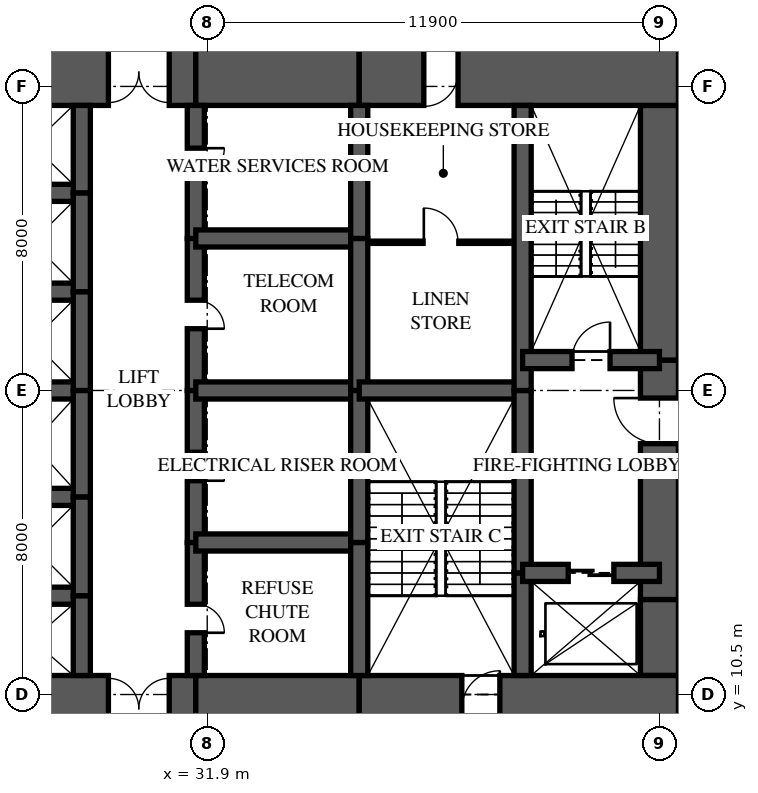
"""IFC4 building model, lengths in metres.
Left out: names, types, materials, properties, quantities, classifications, styles, units other than length and angle.
Written with IfcOpenShell. Run it as: python <this file> out.ifc"""

import sys

from ifc_helpers import new_model, si_unit, direction, frame, frame_2d, origin, place, context, subcontext, project, spatial, rectangle, extrude, element, fill, save


model = new_model("IFC4")
c1 = context("Model", 3, precision=1e-05, world=origin(), true_north=direction((0.0, 1.0)))
c2 = subcontext(c1, "Body", "Model", "MODEL_VIEW")
j1 = project(units=[si_unit("LENGTHUNIT", "METRE"), si_unit("PLANEANGLEUNIT", "RADIAN")], contexts=[c1])
p1 = place(None, origin())
s1 = spatial("IfcSite", under=j1, at=p1, CompositionType="ELEMENT")
p2 = place(p1, origin())
s2 = spatial("IfcBuilding", under=s1, at=p2, CompositionType="ELEMENT")
p3 = place(p2, frame((0.0, 0.0, 16.0)))
s3 = spatial("IfcBuildingStorey", under=s2, at=p3, CompositionType="ELEMENT", Elevation=16.0)
p4 = place(p3, frame((26.0, 10.125, 0.0), z_axis=(0.0, 0.0, 1.0), x_axis=(1.0, 0.0, 0.0)))
e1 = element("IfcWall", 1, at=p4, inside=s3, PredefinedType="SHEAR", context=c2, shape_type="SweptSolid", body=[
    extrude(rectangle(XDim=5.6, YDim=1.75, at=frame_2d((2.8, 0.0))), origin(), (0.0, 0.0, 1.0), 5.0),
])
p5 = place(p4, frame((3.3, 0.0, 0.0)))
e2 = element("IfcOpeningElement", 2, at=p5, cuts=e1, PredefinedType="OPENING", context=c2, shape_type="SweptSolid", body=[
    extrude(rectangle(XDim=1.6, YDim=2.1, at=frame_2d((0.8, 1.05))), frame((0.0, 0.885, 0.0), z_axis=(0.0, -1.0, 0.0), x_axis=(1.0, 0.0, 0.0)), (0.0, 0.0, 1.0), 1.77),
])
p6 = place(p3, frame((31.6, 10.125, 0.0), z_axis=(0.0, 0.0, 1.0), x_axis=(1.0, 0.0, 0.0)))
e3 = element("IfcWall", 3, at=p6, inside=s3, PredefinedType="SHEAR", context=c2, shape_type="SweptSolid", body=[
    extrude(rectangle(XDim=4.3, YDim=1.75, at=frame_2d((2.15, 0.0))), origin(), (0.0, 0.0, 1.0), 5.0),
])
p7 = place(p3, frame((35.9, 10.125, 0.0), z_axis=(0.0, 0.0, 1.0), x_axis=(1.0, 0.0, 0.0)))
e4 = element("IfcWall", 4, at=p7, inside=s3, PredefinedType="SHEAR", context=c2, shape_type="SweptSolid", body=[
    extrude(rectangle(XDim=8.4, YDim=1.75, at=frame_2d((4.2, 0.0))), origin(), (0.0, 0.0, 1.0), 5.0),
])
p8 = place(p7, frame((2.7, 0.0, 0.0)))
e5 = element("IfcOpeningElement", 5, at=p8, cuts=e4, PredefinedType="OPENING", context=c2, shape_type="SweptSolid", body=[
    extrude(rectangle(XDim=1.0, YDim=2.1, at=frame_2d((0.5, 1.05))), frame((0.0, 0.885, 0.0), z_axis=(0.0, -1.0, 0.0), x_axis=(1.0, 0.0, 0.0)), (0.0, 0.0, 1.0), 1.77),
])
p9 = place(p3, frame((44.3, 26.875, 0.0), z_axis=(0.0, 0.0, 1.0), x_axis=(-1.0, 0.0, 0.0)))
e6 = element("IfcWall", 6, at=p9, inside=s3, PredefinedType="SHEAR", context=c2, shape_type="SweptSolid", body=[
    extrude(rectangle(XDim=8.4, YDim=1.75, at=frame_2d((4.2, 0.0))), origin(), (0.0, 0.0, 1.0), 5.0),
])
p10 = place(p9, frame((5.8, 0.0, 0.0)))
e7 = element("IfcOpeningElement", 7, at=p10, cuts=e6, PredefinedType="OPENING", context=c2, shape_type="SweptSolid", body=[
    extrude(rectangle(XDim=0.9, YDim=2.1, at=frame_2d((0.45, 1.05))), frame((0.0, 0.885, 0.0), z_axis=(0.0, -1.0, 0.0), x_axis=(1.0, 0.0, 0.0)), (0.0, 0.0, 1.0), 1.77),
])
p11 = place(p3, frame((35.9, 26.875, 0.0), z_axis=(0.0, 0.0, 1.0), x_axis=(-1.0, 0.0, 0.0)))
e8 = element("IfcWall", 8, at=p11, inside=s3, PredefinedType="SHEAR", context=c2, shape_type="SweptSolid", body=[
    extrude(rectangle(XDim=4.3, YDim=1.75, at=frame_2d((2.15, 0.0))), origin(), (0.0, 0.0, 1.0), 5.0),
])
p12 = place(p3, frame((31.6, 26.875, 0.0), z_axis=(0.0, 0.0, 1.0), x_axis=(-1.0, 0.0, 0.0)))
e9 = element("IfcWall", 9, at=p12, inside=s3, PredefinedType="SHEAR", context=c2, shape_type="SweptSolid", body=[
    extrude(rectangle(XDim=5.6, YDim=1.75, at=frame_2d((2.8, 0.0))), origin(), (0.0, 0.0, 1.0), 5.0),
])
p13 = place(p12, frame((0.7, 0.0, 0.0)))
e10 = element("IfcOpeningElement", 10, at=p13, cuts=e9, PredefinedType="OPENING", context=c2, shape_type="SweptSolid", body=[
    extrude(rectangle(XDim=1.6, YDim=2.1, at=frame_2d((0.8, 1.05))), frame((0.0, 0.885, 0.0), z_axis=(0.0, -1.0, 0.0), x_axis=(1.0, 0.0, 0.0)), (0.0, 0.0, 1.0), 1.77),
])
p14 = place(p3, frame((43.8, 11.0, 0.0), z_axis=(0.0, 0.0, 1.0), x_axis=(0.0, 1.0, 0.0)))
e11 = element("IfcWall", 11, at=p14, inside=s3, PredefinedType="SHEAR", context=c2, shape_type="SweptSolid", body=[
    extrude(rectangle(XDim=2.0, YDim=1.0, at=frame_2d((1.0, 0.0))), origin(), (0.0, 0.0, 1.0), 5.0),
])
p15 = place(p3, frame((43.8, 13.0, 0.0), z_axis=(0.0, 0.0, 1.0), x_axis=(0.0, 1.0, 0.0)))
e12 = element("IfcWall", 12, at=p15, inside=s3, PredefinedType="SHEAR", context=c2, shape_type="SweptSolid", body=[
    extrude(rectangle(XDim=6.3, YDim=1.0, at=frame_2d((3.15, 0.0))), origin(), (0.0, 0.0, 1.0), 5.0),
])
p16 = place(p15, frame((4.1, 0.0, 0.0)))
e13 = element("IfcOpeningElement", 13, at=p16, cuts=e12, PredefinedType="OPENING", context=c2, shape_type="SweptSolid", body=[
    extrude(rectangle(XDim=1.2, YDim=2.2, at=frame_2d((0.6, 1.1))), frame((0.0, 0.51, 0.0), z_axis=(0.0, -1.0, 0.0), x_axis=(1.0, 0.0, 0.0)), (0.0, 0.0, 1.0), 1.02),
])
p17 = place(p3, frame((43.8, 19.3, 0.0), z_axis=(0.0, 0.0, 1.0), x_axis=(0.0, 1.0, 0.0)))
e14 = element("IfcWall", 14, at=p17, inside=s3, PredefinedType="SHEAR", context=c2, shape_type="SweptSolid", body=[
    extrude(rectangle(XDim=6.7, YDim=1.0, at=frame_2d((3.35, 0.0))), origin(), (0.0, 0.0, 1.0), 5.0),
])
p18 = place(p3, frame((28.6, 11.0, 0.0), z_axis=(0.0, 0.0, 1.0), x_axis=(0.0, 1.0, 0.0)))
e15 = element("IfcWall", 15, at=p18, inside=s3, PredefinedType="SHEAR", context=c2, shape_type="SweptSolid", body=[
    extrude(rectangle(XDim=2.1, YDim=0.45, at=frame_2d((1.05, 0.0))), origin(), (0.0, 0.0, 1.0), 5.0),
])
p19 = place(p3, frame((28.6, 13.1, 0.0), z_axis=(0.0, 0.0, 1.0), x_axis=(0.0, 1.0, 0.0)))
e16 = element("IfcWall", 16, at=p19, inside=s3, PredefinedType="SHEAR", context=c2, shape_type="SweptSolid", body=[
    extrude(rectangle(XDim=2.6, YDim=0.45, at=frame_2d((1.3, 0.0))), origin(), (0.0, 0.0, 1.0), 5.0),
])
p20 = place(p3, frame((28.6, 15.7, 0.0), z_axis=(0.0, 0.0, 1.0), x_axis=(0.0, 1.0, 0.0)))
e17 = element("IfcWall", 17, at=p20, inside=s3, PredefinedType="SHEAR", context=c2, shape_type="SweptSolid", body=[
    extrude(rectangle(XDim=2.8, YDim=0.45, at=frame_2d((1.4, 0.0))), origin(), (0.0, 0.0, 1.0), 5.0),
])
p21 = place(p3, frame((28.6, 18.5, 0.0), z_axis=(0.0, 0.0, 1.0), x_axis=(0.0, 1.0, 0.0)))
e18 = element("IfcWall", 18, at=p21, inside=s3, PredefinedType="SHEAR", context=c2, shape_type="SweptSolid", body=[
    extrude(rectangle(XDim=2.6, YDim=0.45, at=frame_2d((1.3, 0.0))), origin(), (0.0, 0.0, 1.0), 5.0),
])
p22 = place(p3, frame((28.6, 21.1, 0.0), z_axis=(0.0, 0.0, 1.0), x_axis=(0.0, 1.0, 0.0)))
e19 = element("IfcWall", 19, at=p22, inside=s3, PredefinedType="SHEAR", context=c2, shape_type="SweptSolid", body=[
    extrude(rectangle(XDim=2.6, YDim=0.45, at=frame_2d((1.3, 0.0))), origin(), (0.0, 0.0, 1.0), 5.0),
])
p23 = place(p3, frame((28.6, 23.7, 0.0), z_axis=(0.0, 0.0, 1.0), x_axis=(0.0, 1.0, 0.0)))
e20 = element("IfcWall", 20, at=p23, inside=s3, PredefinedType="SHEAR", context=c2, shape_type="SweptSolid", body=[
    extrude(rectangle(XDim=2.3, YDim=0.45, at=frame_2d((1.15, 0.0))), origin(), (0.0, 0.0, 1.0), 5.0),
])
p24 = place(p3, frame((31.6, 11.0, 0.0), z_axis=(0.0, 0.0, 1.0), x_axis=(0.0, 1.0, 0.0)))
e21 = element("IfcWall", 21, at=p24, inside=s3, PredefinedType="SHEAR", context=c2, shape_type="SweptSolid", body=[
    extrude(rectangle(XDim=3.5, YDim=0.45, at=frame_2d((1.75, 0.0))), origin(), (0.0, 0.0, 1.0), 5.0),
])
p25 = place(p24, frame((1.125, 0.0, 0.0)))
e22 = element("IfcOpeningElement", 22, at=p25, cuts=e21, PredefinedType="OPENING", context=c2, shape_type="SweptSolid", body=[
    extrude(rectangle(XDim=0.75, YDim=2.1, at=frame_2d((0.375, 1.05))), frame((0.0, 0.235, 0.0), z_axis=(0.0, -1.0, 0.0), x_axis=(1.0, 0.0, 0.0)), (0.0, 0.0, 1.0), 0.47),
])
p26 = place(p3, frame((31.6, 14.5, 0.0), z_axis=(0.0, 0.0, 1.0), x_axis=(0.0, 1.0, 0.0)))
e23 = element("IfcWall", 23, at=p26, inside=s3, PredefinedType="SHEAR", context=c2, shape_type="SweptSolid", body=[
    extrude(rectangle(XDim=4.0, YDim=0.45, at=frame_2d((2.0, 0.0))), origin(), (0.0, 0.0, 1.0), 5.0),
])
p27 = place(p26, frame((1.625, 0.0, 0.0)))
e24 = element("IfcOpeningElement", 24, at=p27, cuts=e23, PredefinedType="OPENING", context=c2, shape_type="SweptSolid", body=[
    extrude(rectangle(XDim=0.75, YDim=2.1, at=frame_2d((0.375, 1.05))), frame((0.0, 0.235, 0.0), z_axis=(0.0, -1.0, 0.0), x_axis=(1.0, 0.0, 0.0)), (0.0, 0.0, 1.0), 0.47),
])
p28 = place(p3, frame((31.6, 18.5, 0.0), z_axis=(0.0, 0.0, 1.0), x_axis=(0.0, 1.0, 0.0)))
e25 = element("IfcWall", 25, at=p28, inside=s3, PredefinedType="SHEAR", context=c2, shape_type="SweptSolid", body=[
    extrude(rectangle(XDim=4.0, YDim=0.45, at=frame_2d((2.0, 0.0))), origin(), (0.0, 0.0, 1.0), 5.0),
])
p29 = place(p28, frame((1.625, 0.0, 0.0)))
e26 = element("IfcOpeningElement", 26, at=p29, cuts=e25, PredefinedType="OPENING", context=c2, shape_type="SweptSolid", body=[
    extrude(rectangle(XDim=0.75, YDim=2.1, at=frame_2d((0.375, 1.05))), frame((0.0, 0.235, 0.0), z_axis=(0.0, -1.0, 0.0), x_axis=(1.0, 0.0, 0.0)), (0.0, 0.0, 1.0), 0.47),
])
p30 = place(p3, frame((31.6, 22.5, 0.0), z_axis=(0.0, 0.0, 1.0), x_axis=(0.0, 1.0, 0.0)))
e27 = element("IfcWall", 27, at=p30, inside=s3, PredefinedType="SHEAR", context=c2, shape_type="SweptSolid", body=[
    extrude(rectangle(XDim=3.5, YDim=0.45, at=frame_2d((1.75, 0.0))), origin(), (0.0, 0.0, 1.0), 5.0),
])
p31 = place(p30, frame((1.625, 0.0, 0.0)))
e28 = element("IfcOpeningElement", 28, at=p31, cuts=e27, PredefinedType="OPENING", context=c2, shape_type="SweptSolid", body=[
    extrude(rectangle(XDim=0.75, YDim=2.1, at=frame_2d((0.375, 1.05))), frame((0.0, 0.235, 0.0), z_axis=(0.0, -1.0, 0.0), x_axis=(1.0, 0.0, 0.0)), (0.0, 0.0, 1.0), 0.47),
])
p32 = place(p3, frame((35.9, 11.0, 0.0), z_axis=(0.0, 0.0, 1.0), x_axis=(0.0, 1.0, 0.0)))
e29 = element("IfcWall", 29, at=p32, inside=s3, PredefinedType="SHEAR", context=c2, shape_type="SweptSolid", body=[
    extrude(rectangle(XDim=3.5, YDim=0.45, at=frame_2d((1.75, 0.0))), origin(), (0.0, 0.0, 1.0), 5.0),
])
for number, where, z_axis, x_axis in (
    (30, (35.9, 14.5, 0.0), (0.0, 0.0, 1.0), (0.0, 1.0, 0.0)),
    (31, (35.9, 18.5, 0.0), (0.0, 0.0, 1.0), (0.0, 1.0, 0.0)),
):
    element("IfcWall", number, at=place(p3, frame(where, z_axis=z_axis, x_axis=x_axis)), inside=s3, PredefinedType="SHEAR", context=c2, shape_type="SweptSolid", body=[
        extrude(rectangle(XDim=4.0, YDim=0.45, at=frame_2d((2.0, 0.0))), origin(), (0.0, 0.0, 1.0), 5.0),
    ])
p33 = place(p3, frame((35.9, 22.5, 0.0), z_axis=(0.0, 0.0, 1.0), x_axis=(0.0, 1.0, 0.0)))
e32 = element("IfcWall", 32, at=p33, inside=s3, PredefinedType="SHEAR", context=c2, shape_type="SweptSolid", body=[
    extrude(rectangle(XDim=3.5, YDim=0.45, at=frame_2d((1.75, 0.0))), origin(), (0.0, 0.0, 1.0), 5.0),
])
p34 = place(p3, frame((40.2, 11.0, 0.0), z_axis=(0.0, 0.0, 1.0), x_axis=(0.0, 1.0, 0.0)))
e33 = element("IfcWall", 33, at=p34, inside=s3, PredefinedType="SHEAR", context=c2, shape_type="SweptSolid", body=[
    extrude(rectangle(XDim=2.7, YDim=0.45, at=frame_2d((1.35, 0.0))), origin(), (0.0, 0.0, 1.0), 5.0),
])
p35 = place(p3, frame((40.2, 13.7, 0.0), z_axis=(0.0, 0.0, 1.0), x_axis=(0.0, 1.0, 0.0)))
e34 = element("IfcWall", 34, at=p35, inside=s3, PredefinedType="SHEAR", context=c2, shape_type="SweptSolid", body=[
    extrude(rectangle(XDim=4.8, YDim=0.45, at=frame_2d((2.4, 0.0))), origin(), (0.0, 0.0, 1.0), 5.0),
])
p36 = place(p3, frame((40.2, 18.5, 0.0), z_axis=(0.0, 0.0, 1.0), x_axis=(0.0, 1.0, 0.0)))
e35 = element("IfcWall", 35, at=p36, inside=s3, PredefinedType="SHEAR", context=c2, shape_type="SweptSolid", body=[
    extrude(rectangle(XDim=7.5, YDim=0.45, at=frame_2d((3.75, 0.0))), origin(), (0.0, 0.0, 1.0), 5.0),
])
for number, where, z_axis, x_axis in (
    (36, (26.0, 13.1, 0.0), (0.0, 0.0, 1.0), (1.0, 0.0, 0.0)),
    (37, (26.0, 15.7, 0.0), (0.0, 0.0, 1.0), (1.0, 0.0, 0.0)),
    (38, (26.0, 18.5, 0.0), (0.0, 0.0, 1.0), (1.0, 0.0, 0.0)),
    (39, (26.0, 21.1, 0.0), (0.0, 0.0, 1.0), (1.0, 0.0, 0.0)),
    (40, (26.0, 23.7, 0.0), (0.0, 0.0, 1.0), (1.0, 0.0, 0.0)),
):
    element("IfcWall", number, at=place(p3, frame(where, z_axis=z_axis, x_axis=x_axis)), inside=s3, PredefinedType="SHEAR", context=c2, shape_type="SweptSolid", body=[
        extrude(rectangle(XDim=2.6, YDim=0.45, at=frame_2d((1.3, 0.0))), origin(), (0.0, 0.0, 1.0), 5.0),
    ])
for number, where, z_axis, x_axis in (
    (41, (31.6, 14.5, 0.0), (0.0, 0.0, 1.0), (1.0, 0.0, 0.0)),
    (42, (31.6, 18.5, 0.0), (0.0, 0.0, 1.0), (1.0, 0.0, 0.0)),
    (43, (31.6, 22.5, 0.0), (0.0, 0.0, 1.0), (1.0, 0.0, 0.0)),
):
    element("IfcWall", number, at=place(p3, frame(where, z_axis=z_axis, x_axis=x_axis)), inside=s3, PredefinedType="SHEAR", context=c2, shape_type="SweptSolid", body=[
        extrude(rectangle(XDim=4.3, YDim=0.45, at=frame_2d((2.15, 0.0))), origin(), (0.0, 0.0, 1.0), 5.0),
    ])
p37 = place(p3, frame((35.9, 18.5, 0.0), z_axis=(0.0, 0.0, 1.0), x_axis=(1.0, 0.0, 0.0)))
e44 = element("IfcWall", 44, at=p37, inside=s3, PredefinedType="SHEAR", context=c2, shape_type="SweptSolid", body=[
    extrude(rectangle(XDim=4.3, YDim=0.45, at=frame_2d((2.15, 0.0))), origin(), (0.0, 0.0, 1.0), 5.0),
])
p38 = place(p3, frame((40.2, 13.7, 0.0), z_axis=(0.0, 0.0, 1.0), x_axis=(1.0, 0.0, 0.0)))
e45 = element("IfcWall", 45, at=p38, inside=s3, PredefinedType="SHEAR", context=c2, shape_type="SweptSolid", body=[
    extrude(rectangle(XDim=3.6, YDim=0.45, at=frame_2d((1.8, 0.0))), origin(), (0.0, 0.0, 1.0), 5.0),
])
p39 = place(p38, frame((1.2, 0.0, 0.0)))
e46 = element("IfcOpeningElement", 46, at=p39, cuts=e45, PredefinedType="OPENING", context=c2, shape_type="SweptSolid", body=[
    extrude(rectangle(XDim=1.2, YDim=2.1, at=frame_2d((0.6, 1.05))), frame((0.0, 0.235, 0.0), z_axis=(0.0, -1.0, 0.0), x_axis=(1.0, 0.0, 0.0)), (0.0, 0.0, 1.0), 0.47),
])
p40 = place(p3, frame((40.2, 19.3, 0.0), z_axis=(0.0, 0.0, 1.0), x_axis=(1.0, 0.0, 0.0)))
e47 = element("IfcWall", 47, at=p40, inside=s3, PredefinedType="SHEAR", context=c2, shape_type="SweptSolid", body=[
    extrude(rectangle(XDim=3.6, YDim=0.45, at=frame_2d((1.8, 0.0))), origin(), (0.0, 0.0, 1.0), 5.0),
])
p41 = place(p40, frame((1.3, 0.0, 0.0)))
e48 = element("IfcOpeningElement", 48, at=p41, cuts=e47, PredefinedType="OPENING", context=c2, shape_type="SweptSolid", body=[
    extrude(rectangle(XDim=1.0, YDim=2.1, at=frame_2d((0.5, 1.05))), frame((0.0, 0.235, 0.0), z_axis=(0.0, -1.0, 0.0), x_axis=(1.0, 0.0, 0.0)), (0.0, 0.0, 1.0), 0.47),
])
p42 = place(p3, frame((36.125, 22.4, 0.0), z_axis=(0.0, 0.0, 1.0), x_axis=(1.0, 0.0, 0.0)))
e49 = element("IfcWall", 49, at=p42, inside=s3, PredefinedType="PARTITIONING", context=c2, shape_type="SweptSolid", body=[
    extrude(rectangle(XDim=3.85, YDim=0.1, at=frame_2d((1.925, 0.0))), origin(), (0.0, 0.0, 1.0), 4.72),
])
p43 = place(p42, frame((1.475, 0.0, 0.0)))
e50 = element("IfcOpeningElement", 50, at=p43, cuts=e49, PredefinedType="OPENING", context=c2, shape_type="SweptSolid", body=[
    extrude(rectangle(XDim=0.9, YDim=2.1, at=frame_2d((0.45, 1.05))), frame((0.0, 0.06, 0.0), z_axis=(0.0, -1.0, 0.0), x_axis=(1.0, 0.0, 0.0)), (0.0, 0.0, 1.0), 0.12),
])
p44 = place(p43, origin())
e51 = element("IfcDoor", 51, at=p44, inside=s3, OperationType="SINGLE_SWING_LEFT", PredefinedType="DOOR", context=c2, shape_type="SweptSolid", body=[
    extrude(rectangle(XDim=0.9, YDim=2.1, at=frame_2d((0.45, 1.05))), frame((0.0, 0.025, 0.0), z_axis=(0.0, -1.0, 0.0), x_axis=(1.0, 0.0, 0.0)), (0.0, 0.0, 1.0), 0.05),
])
fill(e50, e51)
p45 = place(p41, origin())
e52 = element("IfcDoor", 52, at=p45, inside=s3, OperationType="SINGLE_SWING_RIGHT", PredefinedType="DOOR", context=c2, shape_type="SweptSolid", body=[
    extrude(rectangle(XDim=1.0, YDim=2.1, at=frame_2d((0.5, 1.05))), frame((0.0, 0.025, 0.0), z_axis=(0.0, -1.0, 0.0), x_axis=(1.0, 0.0, 0.0)), (0.0, 0.0, 1.0), 0.05),
])
fill(e48, e52)
p46 = place(p16, origin())
e53 = element("IfcDoor", 53, at=p46, inside=s3, OperationType="SINGLE_SWING_RIGHT", PredefinedType="DOOR", context=c2, shape_type="SweptSolid", body=[
    extrude(rectangle(XDim=1.2, YDim=2.2, at=frame_2d((0.6, 1.1))), frame((0.0, 0.025, 0.0), z_axis=(0.0, -1.0, 0.0), x_axis=(1.0, 0.0, 0.0)), (0.0, 0.0, 1.0), 0.05),
])
fill(e13, e53)
p47 = place(p39, origin())
e54 = element("IfcDoor", 54, at=p47, inside=s3, OperationType="SLIDING_TO_LEFT", PredefinedType="DOOR", context=c2, shape_type="SweptSolid", body=[
    extrude(rectangle(XDim=1.2, YDim=2.1, at=frame_2d((0.6, 1.05))), frame((0.0, 0.025, 0.0), z_axis=(0.0, -1.0, 0.0), x_axis=(1.0, 0.0, 0.0)), (0.0, 0.0, 1.0), 0.05),
])
fill(e46, e54)
p48 = place(p5, origin())
e55 = element("IfcDoor", 55, at=p48, inside=s3, OperationType="DOUBLE_DOOR_SINGLE_SWING", PredefinedType="DOOR", context=c2, shape_type="SweptSolid", body=[
    extrude(rectangle(XDim=1.6, YDim=2.1, at=frame_2d((0.8, 1.05))), frame((0.0, 0.025, 0.0), z_axis=(0.0, -1.0, 0.0), x_axis=(1.0, 0.0, 0.0)), (0.0, 0.0, 1.0), 0.05),
])
fill(e2, e55)
p49 = place(p13, origin())
e56 = element("IfcDoor", 56, at=p49, inside=s3, OperationType="DOUBLE_DOOR_SINGLE_SWING", PredefinedType="DOOR", context=c2, shape_type="SweptSolid", body=[
    extrude(rectangle(XDim=1.6, YDim=2.1, at=frame_2d((0.8, 1.05))), frame((0.0, 0.025, 0.0), z_axis=(0.0, -1.0, 0.0), x_axis=(1.0, 0.0, 0.0)), (0.0, 0.0, 1.0), 0.05),
])
fill(e10, e56)
p50 = place(p25, frame((0.75, 0.0, 0.0), z_axis=(0.0, 0.0, 1.0), x_axis=(-1.0, 0.0, 0.0)))
e57 = element("IfcDoor", 57, at=p50, inside=s3, OperationType="SINGLE_SWING_RIGHT", PredefinedType="DOOR", context=c2, shape_type="SweptSolid", body=[
    extrude(rectangle(XDim=0.75, YDim=2.1, at=frame_2d((0.375, 1.05))), frame((0.0, 0.025, 0.0), z_axis=(0.0, -1.0, 0.0), x_axis=(1.0, 0.0, 0.0)), (0.0, 0.0, 1.0), 0.05),
])
fill(e22, e57)
p51 = place(p27, frame((0.75, 0.0, 0.0), z_axis=(0.0, 0.0, 1.0), x_axis=(-1.0, 0.0, 0.0)))
e58 = element("IfcDoor", 58, at=p51, inside=s3, OperationType="SINGLE_SWING_RIGHT", PredefinedType="DOOR", context=c2, shape_type="SweptSolid", body=[
    extrude(rectangle(XDim=0.75, YDim=2.1, at=frame_2d((0.375, 1.05))), frame((0.0, 0.025, 0.0), z_axis=(0.0, -1.0, 0.0), x_axis=(1.0, 0.0, 0.0)), (0.0, 0.0, 1.0), 0.05),
])
fill(e24, e58)
p52 = place(p29, frame((0.75, 0.0, 0.0), z_axis=(0.0, 0.0, 1.0), x_axis=(-1.0, 0.0, 0.0)))
e59 = element("IfcDoor", 59, at=p52, inside=s3, OperationType="SINGLE_SWING_RIGHT", PredefinedType="DOOR", context=c2, shape_type="SweptSolid", body=[
    extrude(rectangle(XDim=0.75, YDim=2.1, at=frame_2d((0.375, 1.05))), frame((0.0, 0.025, 0.0), z_axis=(0.0, -1.0, 0.0), x_axis=(1.0, 0.0, 0.0)), (0.0, 0.0, 1.0), 0.05),
])
fill(e26, e59)
p53 = place(p31, frame((0.75, 0.0, 0.0), z_axis=(0.0, 0.0, 1.0), x_axis=(-1.0, 0.0, 0.0)))
e60 = element("IfcDoor", 60, at=p53, inside=s3, OperationType="SINGLE_SWING_LEFT", PredefinedType="DOOR", context=c2, shape_type="SweptSolid", body=[
    extrude(rectangle(XDim=0.75, YDim=2.1, at=frame_2d((0.375, 1.05))), frame((0.0, 0.025, 0.0), z_axis=(0.0, -1.0, 0.0), x_axis=(1.0, 0.0, 0.0)), (0.0, 0.0, 1.0), 0.05),
])
fill(e28, e60)
p54 = place(p8, origin())
e61 = element("IfcDoor", 61, at=p54, inside=s3, OperationType="SINGLE_SWING_RIGHT", PredefinedType="DOOR", context=c2, shape_type="SweptSolid", body=[
    extrude(rectangle(XDim=1.0, YDim=2.1, at=frame_2d((0.5, 1.05))), frame((0.0, 0.025, 0.0), z_axis=(0.0, -1.0, 0.0), x_axis=(1.0, 0.0, 0.0)), (0.0, 0.0, 1.0), 0.05),
])
fill(e5, e61)
p55 = place(p10, origin())
e62 = element("IfcDoor", 62, at=p55, inside=s3, OperationType="SINGLE_SWING_RIGHT", PredefinedType="DOOR", context=c2, shape_type="SweptSolid", body=[
    extrude(rectangle(XDim=0.9, YDim=2.1, at=frame_2d((0.45, 1.05))), frame((0.0, 0.47, 0.0), z_axis=(0.0, -1.0, 0.0), x_axis=(1.0, 0.0, 0.0)), (0.0, 0.0, 1.0), 0.8),
])
fill(e7, e62)
save(model, sys.argv[1])
